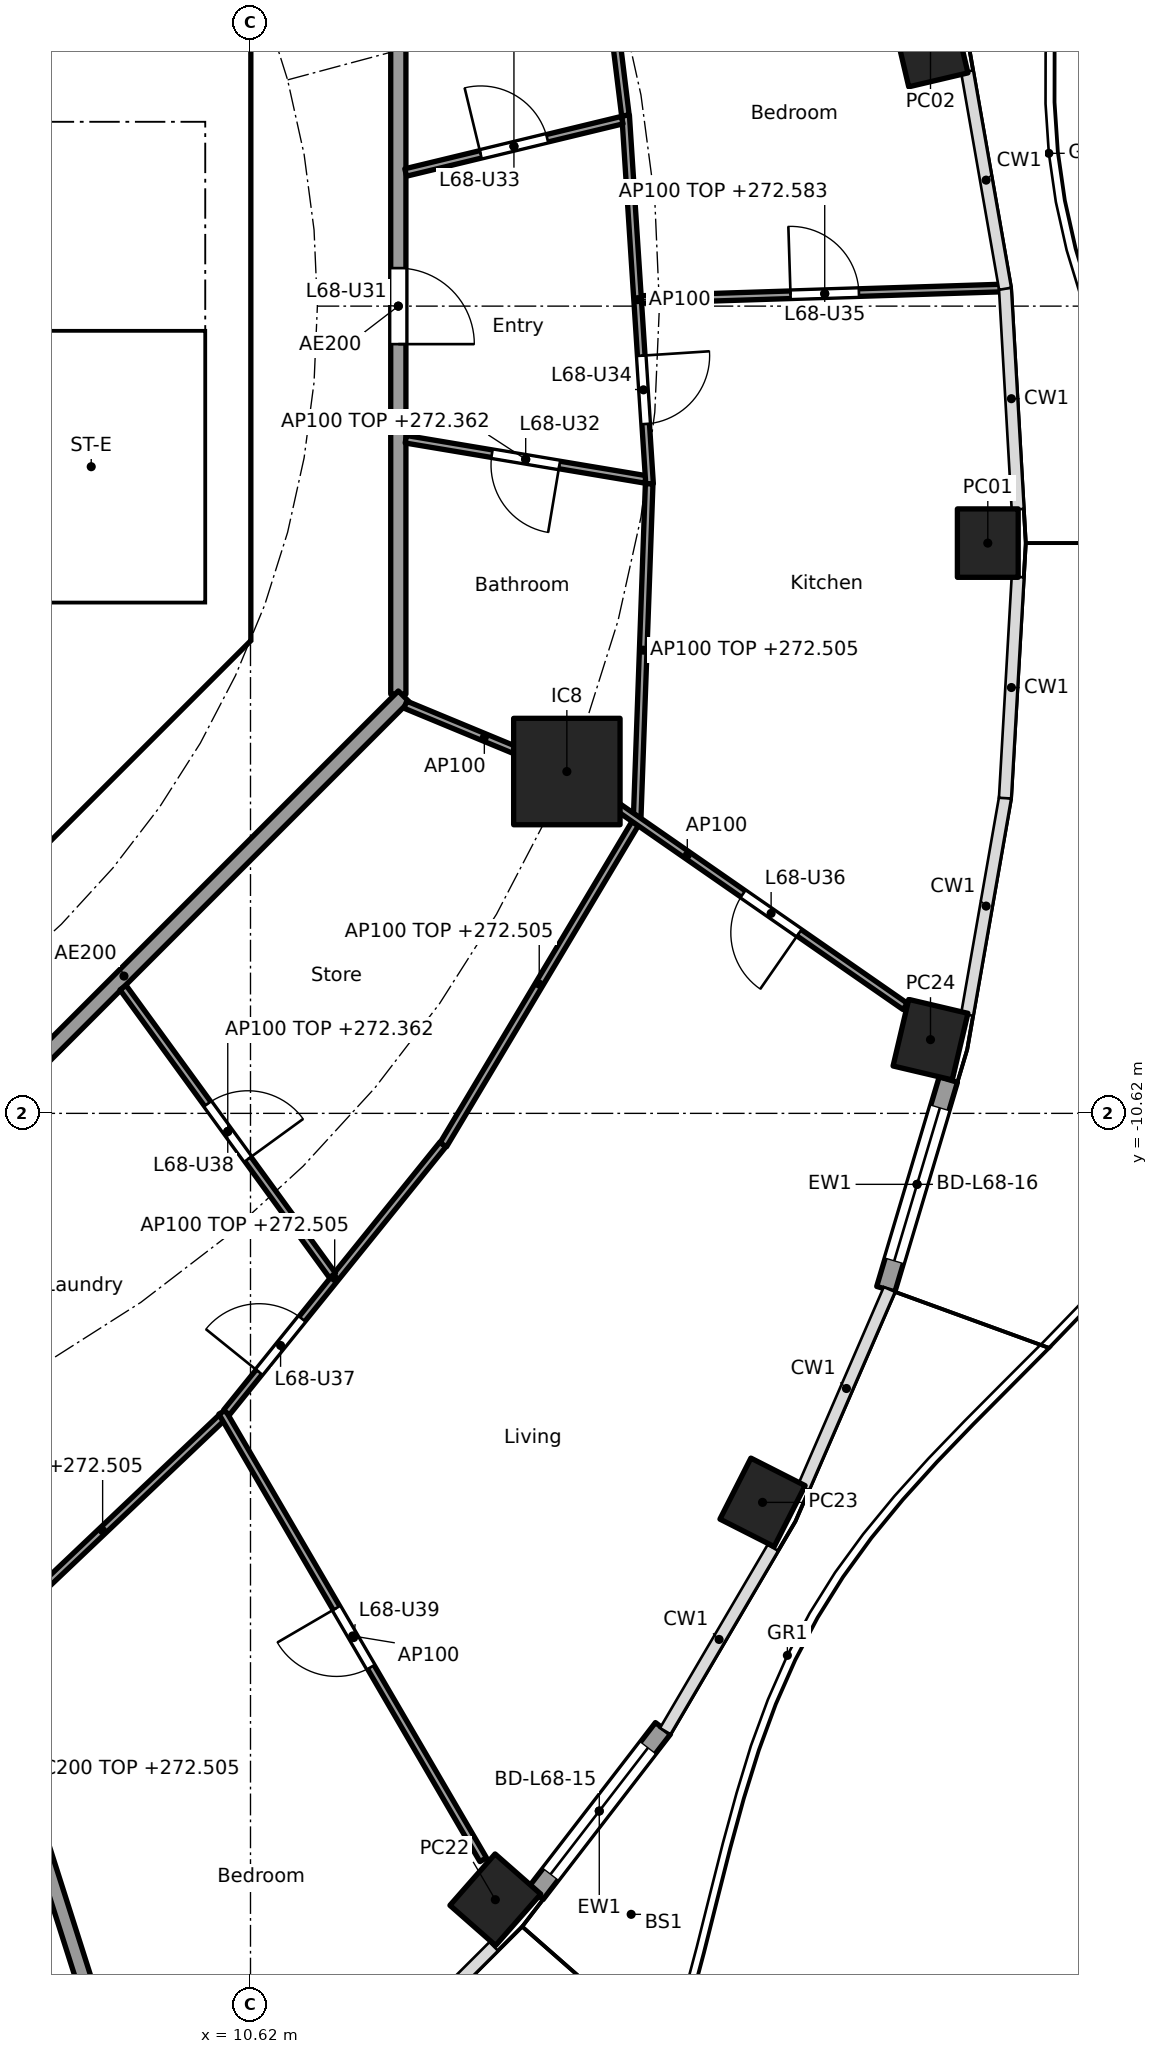
"""IFC4 building model, lengths in metres.
Left out: names, types, materials, properties, quantities, classifications, styles, units other than length and angle.
Written with IfcOpenShell. Run it as: python <this file> out.ifc"""

import sys

from ifc_helpers import new_model, si_unit, direction, frame, frame_2d, origin, origin_2d, place, context, subcontext, project, spatial, polyline, rectangle, hollow_rectangle, outline, extrude, element, fill, save


model = new_model("IFC4")
c1 = context("Model", 3, precision=1e-05, world=origin(), true_north=direction((0.0, 1.0)))
c2 = subcontext(c1, "Body", "Model", "MODEL_VIEW")
j1 = project(units=[si_unit("LENGTHUNIT", "METRE"), si_unit("PLANEANGLEUNIT", "RADIAN")], contexts=[c1])
p1 = place(None, origin())
s1 = spatial("IfcSite", under=j1, at=p1, CompositionType="ELEMENT")
p2 = place(p1, origin())
s2 = spatial("IfcBuilding", under=s1, at=p2, CompositionType="ELEMENT")
p3 = place(p2, frame((0.0, 0.0, 269.6)))
s3 = spatial("IfcBuildingStorey", under=s2, at=p3, CompositionType="ELEMENT", Elevation=269.6)
for number, where, z_axis, x_axis in (
    (1, (20.32, -3.118, 0.0), (0.0, 0.0, 1.0), (0.0, 1.0, 0.0)),
    (2, (19.566, 3.415, 0.0), (0.0, 0.0, 1.0), (-0.229, 0.973, 0.0)),
    (3, (13.841, -20.965, 0.0), (0.0, 0.0, 1.0), (0.66, 0.751, 0.0)),
    (4, (17.356, -15.738, 0.0), (0.0, 0.0, 1.0), (0.452, 0.892, 0.0)),
    (5, (19.566, -9.65, 0.0), (0.0, 0.0, 1.0), (0.229, 0.973, 0.0)),
):
    element("IfcColumn", number, at=place(p3, frame(where, z_axis=z_axis, x_axis=x_axis)), inside=s3, PredefinedType="COLUMN", context=c2, shape_type="SweptSolid", body=[
        extrude(hollow_rectangle(XDim=0.9, YDim=0.8, WallThickness=0.028, at=origin_2d()), origin(), (0.0, 0.0, 1.0), 3.7),
    ])
p4 = place(p3, frame((14.782, -6.123, 0.0), z_axis=(0.0, 0.0, 1.0), x_axis=(1.0, 0.0, 0.0)))
e6 = element("IfcColumn", 6, at=p4, inside=s3, PredefinedType="COLUMN", context=c2, shape_type="SweptSolid", body=[
    extrude(rectangle(XDim=1.4, YDim=1.4, at=origin_2d()), origin(), (0.0, 0.0, 1.0), 3.7),
])
p5 = place(p3, frame((16.047, -18.711, 0.0), z_axis=(0.0, 0.0, 1.0), x_axis=(-0.610432336622, -0.792068407656, 0.0)))
e7 = element("IfcWall", 7, at=p5, inside=s3, PredefinedType="SOLIDWALL", context=c2, shape_type="SweptSolid", body=[
    extrude(rectangle(XDim=2.746, YDim=0.25, at=frame_2d((1.373, 0.0))), origin(), (0.0, 0.0, 1.0), 3.44),
])
p6 = place(p5, frame((0.323, 0.0, 0.0)))
e8 = element("IfcOpeningElement", 8, at=p6, cuts=e7, PredefinedType="OPENING", context=c2, shape_type="SweptSolid", body=[
    extrude(rectangle(XDim=2.1, YDim=2.4, at=frame_2d((1.05, 1.2))), frame((0.0, 0.135, 0.0), z_axis=(0.0, -1.0, 0.0), x_axis=(1.0, 0.0, 0.0)), (0.0, 0.0, 1.0), 0.27),
])
p7 = place(p3, frame((19.801, -10.175, 0.0), z_axis=(0.0, 0.0, 1.0), x_axis=(-0.285899456462, -0.958259620768, 0.0)))
e9 = element("IfcWall", 9, at=p7, inside=s3, PredefinedType="SOLIDWALL", context=c2, shape_type="SweptSolid", body=[
    extrude(rectangle(XDim=2.877, YDim=0.25, at=frame_2d((1.438, 0.0))), origin(), (0.0, 0.0, 1.0), 3.44),
])
p8 = place(p7, frame((0.389, 0.0, 0.0)))
e10 = element("IfcOpeningElement", 10, at=p8, cuts=e9, PredefinedType="OPENING", context=c2, shape_type="SweptSolid", body=[
    extrude(rectangle(XDim=2.1, YDim=2.4, at=frame_2d((1.05, 1.2))), frame((0.0, 0.135, 0.0), z_axis=(0.0, -1.0, 0.0), x_axis=(1.0, 0.0, 0.0)), (0.0, 0.0, 1.0), 0.27),
])
p9 = place(p3, frame((4.613, -9.988, 0.0), z_axis=(0.0, 0.0, 1.0), x_axis=(0.707106781187, 0.707106781187, 0.0)))
e11 = element("IfcWall", 11, at=p9, inside=s3, PredefinedType="SHEAR", context=c2, shape_type="SweptSolid", body=[
    extrude(rectangle(XDim=7.602, YDim=0.6, at=frame_2d((3.801, 0.0))), origin(), (0.0, 0.0, 1.0), 3.44),
])
p10 = place(p9, frame((3.201, 0.0, 0.0)))
e12 = element("IfcOpeningElement", 12, at=p10, cuts=e11, PredefinedType="OPENING", context=c2, shape_type="SweptSolid", body=[
    extrude(rectangle(XDim=1.2, YDim=2.1, at=frame_2d((0.6, 1.05))), frame((0.0, 0.31, 0.0), z_axis=(0.0, -1.0, 0.0), x_axis=(1.0, 0.0, 0.0)), (0.0, 0.0, 1.0), 0.62),
])
p11 = place(p3, origin())
e13 = element("IfcWall", 13, at=p11, inside=s3, PredefinedType="SHEAR", context=c2, shape_type="SweptSolid", body=[
    extrude(outline(polyline([(9.776, -4.401), (10.025, -4.152), (10.025, -3.801), (10.025, 4.152), (9.776, 4.401), (10.2, 4.825), (10.625, 4.401), (10.625, -4.401), (10.2, -4.825), (9.776, -4.401)])), origin(), (0.0, 0.0, 1.0), 3.44),
])
p12 = place(p3, origin())
e14 = element("IfcWall", 14, at=p12, inside=s3, PredefinedType="SOLIDWALL", context=c2, shape_type="SweptSolid", body=[
    extrude(outline(polyline([(10.025, -4.1), (6.7, -4.1), (6.7, -3.9), (10.025, -3.9), (10.025, -4.1)])), origin(), (0.0, 0.0, 1.0), 3.44),
])
p13 = place(p3, frame((6.138, -14.83, 0.0), z_axis=(0.0, 0.0, 1.0), x_axis=(0.303653679037, -0.952782474234, 0.0)))
e15 = element("IfcWall", 15, at=p13, inside=s3, PredefinedType="PARTITIONING", context=c2, shape_type="SweptSolid", body=[
    extrude(rectangle(XDim=10.076, YDim=0.2, at=frame_2d((5.038, 0.0))), origin(), (0.0, 0.0, 1.0), 2.905),
])
p14 = place(p3, frame((12.565, -5.104, 0.0), z_axis=(0.0, 0.0, 1.0), x_axis=(0.0, 1.0, 0.0)))
e16 = element("IfcWall", 16, at=p14, inside=s3, PredefinedType="PARTITIONING", context=c2, shape_type="SweptSolid", body=[
    extrude(rectangle(XDim=10.209, YDim=0.2, at=frame_2d((5.104, 0.0))), origin(), (0.0, 0.0, 1.0), 3.44),
])
p15 = place(p14, frame((4.604, 0.0, 0.0)))
e17 = element("IfcOpeningElement", 17, at=p15, cuts=e16, PredefinedType="OPENING", context=c2, shape_type="SweptSolid", body=[
    extrude(rectangle(XDim=1.0, YDim=2.1, at=frame_2d((0.5, 1.05))), frame((0.0, 0.11, 0.0), z_axis=(0.0, -1.0, 0.0), x_axis=(1.0, 0.0, 0.0)), (0.0, 0.0, 1.0), 0.22),
])
p16 = place(p3, frame((5.275, -12.494, 0.0), z_axis=(0.0, 0.0, 1.0), x_axis=(0.707106781187, 0.707106781187, 0.0)))
e18 = element("IfcWall", 18, at=p16, inside=s3, PredefinedType="PARTITIONING", context=c2, shape_type="SweptSolid", body=[
    extrude(rectangle(XDim=10.409, YDim=0.2, at=frame_2d((5.205, 0.0))), origin(), (0.0, 0.0, 1.0), 3.44),
])
p17 = place(p3, frame((12.663, -1.751, 0.0), z_axis=(0.0, 0.0, 1.0), x_axis=(0.98626156497, -0.165191178529, 0.0)))
e19 = element("IfcWall", 19, at=p17, inside=s3, PredefinedType="PARTITIONING", context=c2, shape_type="SweptSolid", body=[
    extrude(rectangle(XDim=3.198, YDim=0.1, at=frame_2d((1.599, 0.0))), origin(), (0.0, 0.0, 1.0), 2.762),
])
p18 = place(p17, frame((1.149, 0.0, 0.0)))
e20 = element("IfcOpeningElement", 20, at=p18, cuts=e19, PredefinedType="OPENING", context=c2, shape_type="SweptSolid", body=[
    extrude(rectangle(XDim=0.9, YDim=2.1, at=frame_2d((0.45, 1.05))), frame((0.0, 0.06, 0.0), z_axis=(0.0, -1.0, 0.0), x_axis=(1.0, 0.0, 0.0)), (0.0, 0.0, 1.0), 0.12),
])
p19 = place(p3, frame((15.87, -2.338, 0.0), z_axis=(0.0, 0.0, 1.0), x_axis=(-0.064797294757, 0.997898447034, 0.0)))
e21 = element("IfcWall", 21, at=p19, inside=s3, PredefinedType="PARTITIONING", context=c2, shape_type="SweptSolid", body=[
    extrude(rectangle(XDim=4.857, YDim=0.1, at=frame_2d((2.428, 0.0))), origin(), (0.0, 0.0, 1.0), 3.44),
])
p20 = place(p19, frame((0.789, 0.0, 0.0)))
e22 = element("IfcOpeningElement", 22, at=p20, cuts=e21, PredefinedType="OPENING", context=c2, shape_type="SweptSolid", body=[
    extrude(rectangle(XDim=0.9, YDim=2.1, at=frame_2d((0.45, 1.05))), frame((0.0, 0.06, 0.0), z_axis=(0.0, -1.0, 0.0), x_axis=(1.0, 0.0, 0.0)), (0.0, 0.0, 1.0), 0.12),
])
p21 = place(p3, frame((15.865, -2.338, 0.0), z_axis=(0.0, 0.0, 1.0), x_axis=(-0.035902310383, -0.999355304238, 0.0)))
e23 = element("IfcWall", 23, at=p21, inside=s3, PredefinedType="PARTITIONING", context=c2, shape_type="SweptSolid", body=[
    extrude(rectangle(XDim=4.379, YDim=0.1, at=frame_2d((2.19, 0.0))), origin(), (0.0, 0.0, 1.0), 2.905),
])
p22 = place(p3, frame((15.763, 0.087, 0.0), z_axis=(0.0, 0.0, 1.0), x_axis=(0.999492034598, 0.03186962151, 0.0)))
e24 = element("IfcWall", 24, at=p22, inside=s3, PredefinedType="PARTITIONING", context=c2, shape_type="SweptSolid", body=[
    extrude(rectangle(XDim=4.826, YDim=0.1, at=frame_2d((2.413, 0.0))), origin(), (0.0, 0.0, 1.0), 2.983),
])
p23 = place(p22, frame((1.963, 0.0, 0.0)))
e25 = element("IfcOpeningElement", 25, at=p23, cuts=e24, PredefinedType="OPENING", context=c2, shape_type="SweptSolid", body=[
    extrude(rectangle(XDim=0.9, YDim=2.1, at=frame_2d((0.45, 1.05))), frame((0.0, 0.06, 0.0), z_axis=(0.0, -1.0, 0.0), x_axis=(1.0, 0.0, 0.0)), (0.0, 0.0, 1.0), 0.12),
])
p24 = place(p3, frame((12.662, 1.758, 0.0), z_axis=(0.0, 0.0, 1.0), x_axis=(0.972004827836, 0.234960879007, 0.0)))
e26 = element("IfcWall", 26, at=p24, inside=s3, PredefinedType="PARTITIONING", context=c2, shape_type="SweptSolid", body=[
    extrude(rectangle(XDim=2.93, YDim=0.1, at=frame_2d((1.465, 0.0))), origin(), (0.0, 0.0, 1.0), 2.762),
])
p25 = place(p24, frame((1.015, 0.0, 0.0)))
e27 = element("IfcOpeningElement", 27, at=p25, cuts=e26, PredefinedType="OPENING", context=c2, shape_type="SweptSolid", body=[
    extrude(rectangle(XDim=0.9, YDim=2.1, at=frame_2d((0.45, 1.05))), frame((0.0, 0.06, 0.0), z_axis=(0.0, -1.0, 0.0), x_axis=(1.0, 0.0, 0.0)), (0.0, 0.0, 1.0), 0.12),
])
p26 = place(p3, frame((15.552, 2.508, 0.0), z_axis=(0.0, 0.0, 1.0), x_axis=(-0.12196293976, 0.992534654974, 0.0)))
e28 = element("IfcWall", 28, at=p26, inside=s3, PredefinedType="PARTITIONING", context=c2, shape_type="SweptSolid", body=[
    extrude(rectangle(XDim=3.887, YDim=0.1, at=frame_2d((1.944, 0.0))), origin(), (0.0, 0.0, 1.0), 2.905),
])
p27 = place(p3, frame((7.113, -17.592, 0.0), z_axis=(0.0, 0.0, 1.0), x_axis=(0.725433932329, 0.688291805723, 0.0)))
e29 = element("IfcWall", 29, at=p27, inside=s3, PredefinedType="PARTITIONING", context=c2, shape_type="SweptSolid", body=[
    extrude(rectangle(XDim=4.305, YDim=0.1, at=frame_2d((2.153, 0.0))), origin(), (0.0, 0.0, 1.0), 2.905),
])
p28 = place(p3, frame((10.248, -14.551, 0.0), z_axis=(0.0, 0.0, 1.0), x_axis=(0.503826483408, -0.86380488226, 0.0)))
e30 = element("IfcWall", 30, at=p28, inside=s3, PredefinedType="PARTITIONING", context=c2, shape_type="SweptSolid", body=[
    extrude(rectangle(XDim=6.816, YDim=0.1, at=frame_2d((3.408, 0.0))), origin(), (0.0, 0.0, 1.0), 3.44),
])
p29 = place(p28, frame((2.983, 0.0, 0.0)))
e31 = element("IfcOpeningElement", 31, at=p29, cuts=e30, PredefinedType="OPENING", context=c2, shape_type="SweptSolid", body=[
    extrude(rectangle(XDim=0.9, YDim=2.1, at=frame_2d((0.45, 1.05))), frame((0.0, 0.06, 0.0), z_axis=(0.0, -1.0, 0.0), x_axis=(1.0, 0.0, 0.0)), (0.0, 0.0, 1.0), 0.12),
])
p30 = place(p3, frame((10.304, -14.555, 0.0), z_axis=(0.0, 0.0, 1.0), x_axis=(0.628170338674, 0.778075848237, 0.0)))
e32 = element("IfcWall", 32, at=p30, inside=s3, PredefinedType="PARTITIONING", context=c2, shape_type="SweptSolid", body=[
    extrude(rectangle(XDim=4.532, YDim=0.1, at=frame_2d((2.266, 0.0))), origin(), (0.0, 0.0, 1.0), 2.905),
])
p31 = place(p30, frame((0.683, 0.0, 0.0)))
e33 = element("IfcOpeningElement", 33, at=p31, cuts=e32, PredefinedType="OPENING", context=c2, shape_type="SweptSolid", body=[
    extrude(rectangle(XDim=0.9, YDim=2.1, at=frame_2d((0.45, 1.05))), frame((0.0, 0.06, 0.0), z_axis=(0.0, -1.0, 0.0), x_axis=(1.0, 0.0, 0.0)), (0.0, 0.0, 1.0), 0.12),
])
p32 = place(p3, frame((8.943, -8.966, 0.0), z_axis=(0.0, 0.0, 1.0), x_axis=(0.588357698232, -0.808600778463, 0.0)))
e34 = element("IfcWall", 34, at=p32, inside=s3, PredefinedType="PARTITIONING", context=c2, shape_type="SweptSolid", body=[
    extrude(rectangle(XDim=4.682, YDim=0.1, at=frame_2d((2.341, 0.0))), origin(), (0.0, 0.0, 1.0), 2.762),
])
p33 = place(p32, frame((1.891, 0.0, 0.0)))
e35 = element("IfcOpeningElement", 35, at=p33, cuts=e34, PredefinedType="OPENING", context=c2, shape_type="SweptSolid", body=[
    extrude(rectangle(XDim=0.9, YDim=2.1, at=frame_2d((0.45, 1.05))), frame((0.0, 0.06, 0.0), z_axis=(0.0, -1.0, 0.0), x_axis=(1.0, 0.0, 0.0)), (0.0, 0.0, 1.0), 0.12),
])
p34 = place(p3, frame((13.157, -11.033, 0.0), z_axis=(0.0, 0.0, 1.0), x_axis=(0.512736548388, 0.858545998737, 0.0)))
e36 = element("IfcWall", 36, at=p34, inside=s3, PredefinedType="PARTITIONING", context=c2, shape_type="SweptSolid", body=[
    extrude(rectangle(XDim=4.922, YDim=0.1, at=frame_2d((2.461, 0.0))), origin(), (0.0, 0.0, 1.0), 2.905),
])
p35 = place(p3, frame((12.657, -5.243, 0.0), z_axis=(0.0, 0.0, 1.0), x_axis=(0.923864733477, -0.382719158442, 0.0)))
e37 = element("IfcWall", 37, at=p35, inside=s3, PredefinedType="PARTITIONING", context=c2, shape_type="SweptSolid", body=[
    extrude(rectangle(XDim=2.25, YDim=0.1, at=frame_2d((1.125, 0.0))), origin(), (0.0, 0.0, 1.0), 3.44),
])
p36 = place(p3, frame((14.823, -6.151, 0.0), z_axis=(0.0, 0.0, 1.0), x_axis=(0.821435065081, -0.570302054928, 0.0)))
e38 = element("IfcWall", 38, at=p36, inside=s3, PredefinedType="PARTITIONING", context=c2, shape_type="SweptSolid", body=[
    extrude(rectangle(XDim=5.368, YDim=0.1, at=frame_2d((2.684, 0.0))), origin(), (0.0, 0.0, 1.0), 3.44),
])
p37 = place(p36, frame((2.771, 0.0, 0.0)))
e39 = element("IfcOpeningElement", 39, at=p37, cuts=e38, PredefinedType="OPENING", context=c2, shape_type="SweptSolid", body=[
    extrude(rectangle(XDim=0.9, YDim=2.1, at=frame_2d((0.45, 1.05))), frame((0.0, 0.06, 0.0), z_axis=(0.0, -1.0, 0.0), x_axis=(1.0, 0.0, 0.0)), (0.0, 0.0, 1.0), 0.12),
])
p38 = place(p6, origin())
e40 = element("IfcDoor", 40, at=p38, inside=s3, OperationType="SLIDING_TO_LEFT", PredefinedType="DOOR", context=c2, shape_type="SweptSolid", body=[
    extrude(rectangle(XDim=2.1, YDim=2.4, at=frame_2d((1.05, 1.2))), frame((0.0, 0.025, 0.0), z_axis=(0.0, -1.0, 0.0), x_axis=(1.0, 0.0, 0.0)), (0.0, 0.0, 1.0), 0.05),
])
fill(e8, e40)
p39 = place(p8, origin())
e41 = element("IfcDoor", 41, at=p39, inside=s3, OperationType="SLIDING_TO_LEFT", PredefinedType="DOOR", context=c2, shape_type="SweptSolid", body=[
    extrude(rectangle(XDim=2.1, YDim=2.4, at=frame_2d((1.05, 1.2))), frame((0.0, 0.025, 0.0), z_axis=(0.0, -1.0, 0.0), x_axis=(1.0, 0.0, 0.0)), (0.0, 0.0, 1.0), 0.05),
])
fill(e10, e41)
p40 = place(p15, frame((1.0, 0.0, 0.0), x_axis=(-1.0, 0.0, 0.0)))
e42 = element("IfcDoor", 42, at=p40, inside=s3, OperationType="SINGLE_SWING_RIGHT", PredefinedType="DOOR", context=c2, shape_type="SweptSolid", body=[
    extrude(rectangle(XDim=1.0, YDim=2.1, at=frame_2d((0.5, 1.05))), frame((0.0, 0.025, 0.0), z_axis=(0.0, -1.0, 0.0), x_axis=(1.0, 0.0, 0.0)), (0.0, 0.0, 1.0), 0.05),
])
fill(e17, e42)
p41 = place(p18, frame((0.9, 0.0, 0.0), x_axis=(-1.0, 0.0, 0.0)))
e43 = element("IfcDoor", 43, at=p41, inside=s3, OperationType="SINGLE_SWING_LEFT", PredefinedType="DOOR", context=c2, shape_type="SweptSolid", body=[
    extrude(rectangle(XDim=0.9, YDim=2.1, at=frame_2d((0.45, 1.05))), frame((0.0, 0.025, 0.0), z_axis=(0.0, -1.0, 0.0), x_axis=(1.0, 0.0, 0.0)), (0.0, 0.0, 1.0), 0.05),
])
fill(e20, e43)
p42 = place(p25, origin())
e44 = element("IfcDoor", 44, at=p42, inside=s3, OperationType="SINGLE_SWING_LEFT", PredefinedType="DOOR", context=c2, shape_type="SweptSolid", body=[
    extrude(rectangle(XDim=0.9, YDim=2.1, at=frame_2d((0.45, 1.05))), frame((0.0, 0.025, 0.0), z_axis=(0.0, -1.0, 0.0), x_axis=(1.0, 0.0, 0.0)), (0.0, 0.0, 1.0), 0.05),
])
fill(e27, e44)
p43 = place(p20, frame((0.9, 0.0, 0.0), x_axis=(-1.0, 0.0, 0.0)))
e45 = element("IfcDoor", 45, at=p43, inside=s3, OperationType="SINGLE_SWING_LEFT", PredefinedType="DOOR", context=c2, shape_type="SweptSolid", body=[
    extrude(rectangle(XDim=0.9, YDim=2.1, at=frame_2d((0.45, 1.05))), frame((0.0, 0.025, 0.0), z_axis=(0.0, -1.0, 0.0), x_axis=(1.0, 0.0, 0.0)), (0.0, 0.0, 1.0), 0.05),
])
fill(e22, e45)
p44 = place(p23, origin())
e46 = element("IfcDoor", 46, at=p44, inside=s3, OperationType="SINGLE_SWING_LEFT", PredefinedType="DOOR", context=c2, shape_type="SweptSolid", body=[
    extrude(rectangle(XDim=0.9, YDim=2.1, at=frame_2d((0.45, 1.05))), frame((0.0, 0.025, 0.0), z_axis=(0.0, -1.0, 0.0), x_axis=(1.0, 0.0, 0.0)), (0.0, 0.0, 1.0), 0.05),
])
fill(e25, e46)
p45 = place(p37, frame((0.9, 0.0, 0.0), x_axis=(-1.0, 0.0, 0.0)))
e47 = element("IfcDoor", 47, at=p45, inside=s3, OperationType="SINGLE_SWING_LEFT", PredefinedType="DOOR", context=c2, shape_type="SweptSolid", body=[
    extrude(rectangle(XDim=0.9, YDim=2.1, at=frame_2d((0.45, 1.05))), frame((0.0, 0.025, 0.0), z_axis=(0.0, -1.0, 0.0), x_axis=(1.0, 0.0, 0.0)), (0.0, 0.0, 1.0), 0.05),
])
fill(e39, e47)
p46 = place(p31, origin())
e48 = element("IfcDoor", 48, at=p46, inside=s3, OperationType="SINGLE_SWING_LEFT", PredefinedType="DOOR", context=c2, shape_type="SweptSolid", body=[
    extrude(rectangle(XDim=0.9, YDim=2.1, at=frame_2d((0.45, 1.05))), frame((0.0, 0.025, 0.0), z_axis=(0.0, -1.0, 0.0), x_axis=(1.0, 0.0, 0.0)), (0.0, 0.0, 1.0), 0.05),
])
fill(e33, e48)
p47 = place(p33, origin())
e49 = element("IfcDoor", 49, at=p47, inside=s3, OperationType="SINGLE_SWING_RIGHT", PredefinedType="DOOR", context=c2, shape_type="SweptSolid", body=[
    extrude(rectangle(XDim=0.9, YDim=2.1, at=frame_2d((0.45, 1.05))), frame((0.0, 0.025, 0.0), z_axis=(0.0, -1.0, 0.0), x_axis=(1.0, 0.0, 0.0)), (0.0, 0.0, 1.0), 0.05),
])
fill(e35, e49)
p48 = place(p29, frame((0.9, 0.0, 0.0), x_axis=(-1.0, 0.0, 0.0)))
e50 = element("IfcDoor", 50, at=p48, inside=s3, OperationType="SINGLE_SWING_RIGHT", PredefinedType="DOOR", context=c2, shape_type="SweptSolid", body=[
    extrude(rectangle(XDim=0.9, YDim=2.1, at=frame_2d((0.45, 1.05))), frame((0.0, 0.025, 0.0), z_axis=(0.0, -1.0, 0.0), x_axis=(1.0, 0.0, 0.0)), (0.0, 0.0, 1.0), 0.05),
])
fill(e31, e50)
save(model, sys.argv[1])
